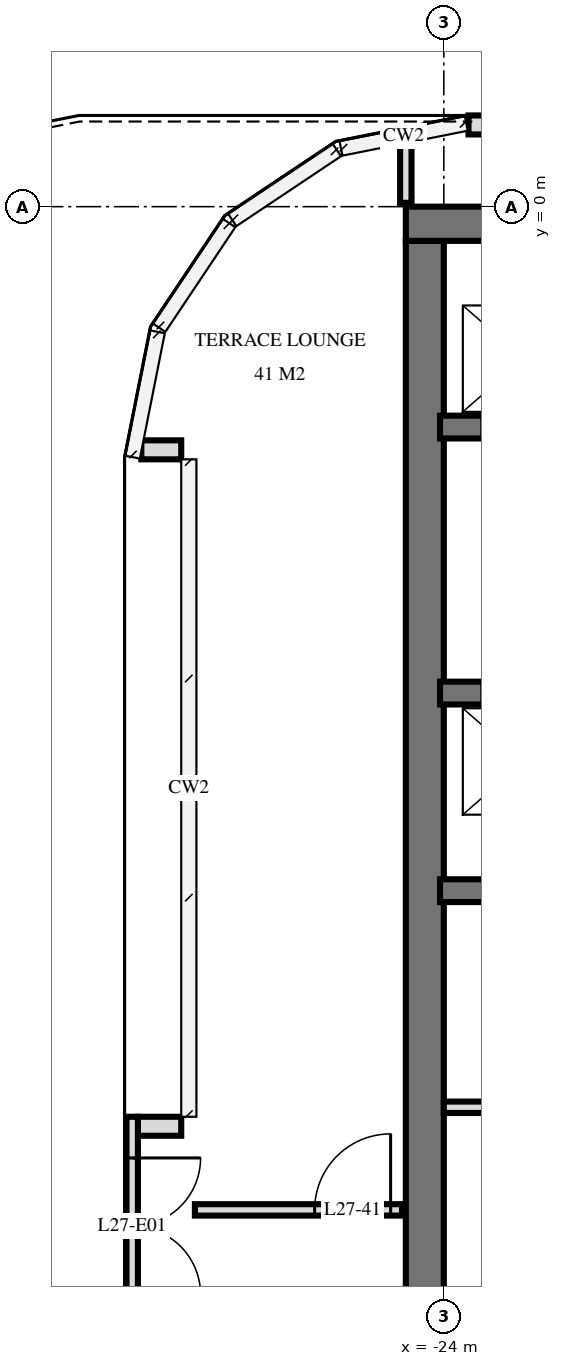
"""IFC4 building model, lengths in metres.
Left out: names, types, materials, properties, quantities, classifications, styles, units other than length and angle.
Written with IfcOpenShell. Run it as: python <this file> out.ifc"""

import sys

from ifc_helpers import new_model, si_unit, direction, frame, frame_2d, origin, place, context, subcontext, project, spatial, rectangle, extrude, element, fill, save


model = new_model("IFC4")
c1 = context("Model", 3, precision=1e-05, world=origin(), true_north=direction((0.0, 1.0)))
c2 = subcontext(c1, "Body", "Model", "MODEL_VIEW")
j1 = project(units=[si_unit("LENGTHUNIT", "METRE"), si_unit("PLANEANGLEUNIT", "RADIAN")], contexts=[c1])
p1 = place(None, origin())
s1 = spatial("IfcSite", under=j1, at=p1, CompositionType="ELEMENT")
p2 = place(p1, origin())
s2 = spatial("IfcBuilding", under=s1, at=p2, CompositionType="ELEMENT")
p3 = place(p2, frame((0.0, 0.0, 106.8)))
s3 = spatial("IfcBuildingStorey", under=s2, at=p3, CompositionType="ELEMENT", Elevation=106.8)
p4 = place(p3, frame((-24.5, -0.225, 0.0), z_axis=(0.0, 0.0, 1.0), x_axis=(1.0, 0.0, 0.0)))
e1 = element("IfcWall", 1, at=p4, inside=s3, PredefinedType="SHEAR", context=c2, shape_type="SweptSolid", body=[
    extrude(rectangle(XDim=14.5, YDim=0.45, at=frame_2d((7.25, 0.0))), origin(), (0.0, 0.0, 1.0), 6.0),
])
p5 = place(p3, frame((-24.25, -14.55, 0.0), z_axis=(0.0, 0.0, 1.0), x_axis=(0.0, 1.0, 0.0)))
e2 = element("IfcWall", 2, at=p5, inside=s3, PredefinedType="SHEAR", context=c2, shape_type="SweptSolid", body=[
    extrude(rectangle(XDim=14.1, YDim=0.5, at=frame_2d((7.05, 0.0))), origin(), (0.0, 0.0, 1.0), 6.0),
])
p6 = place(p3, frame((-24.05, -2.9, 0.0), z_axis=(0.0, 0.0, 1.0), x_axis=(1.0, 0.0, 0.0)))
e3 = element("IfcWall", 3, at=p6, inside=s3, PredefinedType="SHEAR", context=c2, shape_type="SweptSolid", body=[
    extrude(rectangle(XDim=13.7, YDim=0.3, at=frame_2d((6.85, 0.0))), origin(), (0.0, 0.0, 1.0), 6.0),
])
p7 = place(p6, frame((2.95, 0.0, 0.0)))
e4 = element("IfcOpeningElement", 4, at=p7, cuts=e3, PredefinedType="OPENING", context=c2, shape_type="SweptSolid", body=[
    extrude(rectangle(XDim=1.1, YDim=2.1, at=frame_2d((0.55, 1.05))), frame((0.0, 0.16, 0.0), z_axis=(0.0, -1.0, 0.0), x_axis=(1.0, 0.0, 0.0)), (0.0, 0.0, 1.0), 0.32),
])
p8 = place(p6, frame((0.55, 0.0, 0.0)))
e5 = element("IfcOpeningElement", 5, at=p8, cuts=e3, PredefinedType="OPENING", context=c2, shape_type="SweptSolid", body=[
    extrude(rectangle(XDim=1.1, YDim=2.1, at=frame_2d((0.55, 1.05))), frame((0.0, 0.16, 0.0), z_axis=(0.0, -1.0, 0.0), x_axis=(1.0, 0.0, 0.0)), (0.0, 0.0, 1.0), 0.32),
])
p9 = place(p6, frame((6.613, 0.0, 0.0)))
e6 = element("IfcOpeningElement", 6, at=p9, cuts=e3, PredefinedType="OPENING", context=c2, shape_type="SweptSolid", body=[
    extrude(rectangle(XDim=0.9, YDim=2.1, at=frame_2d((0.45, 1.05))), frame((0.0, 0.16, 0.0), z_axis=(0.0, -1.0, 0.0), x_axis=(1.0, 0.0, 0.0)), (0.0, 0.0, 1.0), 0.32),
])
p10 = place(p6, frame((5.188, 0.0, 0.0)))
e7 = element("IfcOpeningElement", 7, at=p10, cuts=e3, PredefinedType="OPENING", context=c2, shape_type="SweptSolid", body=[
    extrude(rectangle(XDim=0.9, YDim=2.1, at=frame_2d((0.45, 1.05))), frame((0.0, 0.16, 0.0), z_axis=(0.0, -1.0, 0.0), x_axis=(1.0, 0.0, 0.0)), (0.0, 0.0, 1.0), 0.32),
])
p11 = place(p6, frame((12.562, 0.0, 0.0)))
e8 = element("IfcOpeningElement", 8, at=p11, cuts=e3, PredefinedType="OPENING", context=c2, shape_type="SweptSolid", body=[
    extrude(rectangle(XDim=1.0, YDim=2.1, at=frame_2d((0.5, 1.05))), frame((0.0, 0.16, 0.0), z_axis=(0.0, -1.0, 0.0), x_axis=(1.0, 0.0, 0.0)), (0.0, 0.0, 1.0), 0.32),
])
p12 = place(p6, frame((11.137, 0.0, 0.0)))
e9 = element("IfcOpeningElement", 9, at=p12, cuts=e3, PredefinedType="OPENING", context=c2, shape_type="SweptSolid", body=[
    extrude(rectangle(XDim=1.0, YDim=2.1, at=frame_2d((0.5, 1.05))), frame((0.0, 0.16, 0.0), z_axis=(0.0, -1.0, 0.0), x_axis=(1.0, 0.0, 0.0)), (0.0, 0.0, 1.0), 0.32),
])
p13 = place(p6, frame((8.85, 0.0, 0.0)))
e10 = element("IfcOpeningElement", 10, at=p13, cuts=e3, PredefinedType="OPENING", context=c2, shape_type="SweptSolid", body=[
    extrude(rectangle(XDim=1.0, YDim=2.1, at=frame_2d((0.5, 1.05))), frame((0.0, 0.16, 0.0), z_axis=(0.0, -1.0, 0.0), x_axis=(1.0, 0.0, 0.0)), (0.0, 0.0, 1.0), 0.32),
])
p14 = place(p3, frame((-24.05, -6.4, 0.0), z_axis=(0.0, 0.0, 1.0), x_axis=(1.0, 0.0, 0.0)))
e11 = element("IfcWall", 11, at=p14, inside=s3, PredefinedType="SHEAR", context=c2, shape_type="SweptSolid", body=[
    extrude(rectangle(XDim=13.7, YDim=0.3, at=frame_2d((6.85, 0.0))), origin(), (0.0, 0.0, 1.0), 6.0),
])
p15 = place(p14, frame((2.95, 0.0, 0.0)))
e12 = element("IfcOpeningElement", 12, at=p15, cuts=e11, PredefinedType="OPENING", context=c2, shape_type="SweptSolid", body=[
    extrude(rectangle(XDim=1.1, YDim=2.1, at=frame_2d((0.55, 1.05))), frame((0.0, 0.16, 0.0), z_axis=(0.0, -1.0, 0.0), x_axis=(1.0, 0.0, 0.0)), (0.0, 0.0, 1.0), 0.32),
])
p16 = place(p14, frame((0.55, 0.0, 0.0)))
e13 = element("IfcOpeningElement", 13, at=p16, cuts=e11, PredefinedType="OPENING", context=c2, shape_type="SweptSolid", body=[
    extrude(rectangle(XDim=1.1, YDim=2.1, at=frame_2d((0.55, 1.05))), frame((0.0, 0.16, 0.0), z_axis=(0.0, -1.0, 0.0), x_axis=(1.0, 0.0, 0.0)), (0.0, 0.0, 1.0), 0.32),
])
p17 = place(p14, frame((5.8, 0.0, 0.0)))
e14 = element("IfcOpeningElement", 14, at=p17, cuts=e11, PredefinedType="OPENING", context=c2, shape_type="SweptSolid", body=[
    extrude(rectangle(XDim=1.1, YDim=2.1, at=frame_2d((0.55, 1.05))), frame((0.0, 0.16, 0.0), z_axis=(0.0, -1.0, 0.0), x_axis=(1.0, 0.0, 0.0)), (0.0, 0.0, 1.0), 0.32),
])
p18 = place(p3, frame((-24.05, -9.0, 0.0), z_axis=(0.0, 0.0, 1.0), x_axis=(1.0, 0.0, 0.0)))
e15 = element("IfcWall", 15, at=p18, inside=s3, PredefinedType="SHEAR", context=c2, shape_type="SweptSolid", body=[
    extrude(rectangle(XDim=13.7, YDim=0.3, at=frame_2d((6.85, 0.0))), origin(), (0.0, 0.0, 1.0), 6.0),
])
p19 = place(p18, frame((8.8, 0.0, 0.0)))
e16 = element("IfcOpeningElement", 16, at=p19, cuts=e15, PredefinedType="OPENING", context=c2, shape_type="SweptSolid", body=[
    extrude(rectangle(XDim=1.1, YDim=2.1, at=frame_2d((0.55, 1.05))), frame((0.0, 0.16, 0.0), z_axis=(0.0, -1.0, 0.0), x_axis=(1.0, 0.0, 0.0)), (0.0, 0.0, 1.0), 0.32),
])
p20 = place(p3, frame((23.675, 1.075, 0.0), z_axis=(0.0, 0.0, 1.0), x_axis=(-1.0, 0.0, 0.0)))
e17 = element("IfcWall", 17, at=p20, inside=s3, PredefinedType="SOLIDWALL", context=c2, shape_type="SweptSolid", body=[
    extrude(rectangle(XDim=47.351, YDim=0.25, at=frame_2d((23.675, 0.0))), origin(), (0.0, 0.0, 1.0), 5.72),
])
p21 = place(p20, frame((0.378, 0.0, 0.858)))
e18 = element("IfcOpeningElement", 18, at=p21, cuts=e17, PredefinedType="OPENING", context=c2, shape_type="SweptSolid", body=[
    extrude(rectangle(XDim=2.4, YDim=3.6, at=frame_2d((1.2, 1.8))), frame((0.0, 0.135, 0.0), z_axis=(0.0, -1.0, 0.0), x_axis=(1.0, 0.0, 0.0)), (0.0, 0.0, 1.0), 0.27),
])
p22 = place(p20, frame((3.535, 0.0, 0.858)))
e19 = element("IfcOpeningElement", 19, at=p22, cuts=e17, PredefinedType="OPENING", context=c2, shape_type="SweptSolid", body=[
    extrude(rectangle(XDim=2.4, YDim=3.6, at=frame_2d((1.2, 1.8))), frame((0.0, 0.135, 0.0), z_axis=(0.0, -1.0, 0.0), x_axis=(1.0, 0.0, 0.0)), (0.0, 0.0, 1.0), 0.27),
])
p23 = place(p20, frame((6.692, 0.0, 0.858)))
e20 = element("IfcOpeningElement", 20, at=p23, cuts=e17, PredefinedType="OPENING", context=c2, shape_type="SweptSolid", body=[
    extrude(rectangle(XDim=2.4, YDim=3.6, at=frame_2d((1.2, 1.8))), frame((0.0, 0.135, 0.0), z_axis=(0.0, -1.0, 0.0), x_axis=(1.0, 0.0, 0.0)), (0.0, 0.0, 1.0), 0.27),
])
p24 = place(p20, frame((9.848, 0.0, 0.858)))
e21 = element("IfcOpeningElement", 21, at=p24, cuts=e17, PredefinedType="OPENING", context=c2, shape_type="SweptSolid", body=[
    extrude(rectangle(XDim=2.4, YDim=3.6, at=frame_2d((1.2, 1.8))), frame((0.0, 0.135, 0.0), z_axis=(0.0, -1.0, 0.0), x_axis=(1.0, 0.0, 0.0)), (0.0, 0.0, 1.0), 0.27),
])
p25 = place(p20, frame((13.005, 0.0, 0.858)))
e22 = element("IfcOpeningElement", 22, at=p25, cuts=e17, PredefinedType="OPENING", context=c2, shape_type="SweptSolid", body=[
    extrude(rectangle(XDim=2.4, YDim=3.6, at=frame_2d((1.2, 1.8))), frame((0.0, 0.135, 0.0), z_axis=(0.0, -1.0, 0.0), x_axis=(1.0, 0.0, 0.0)), (0.0, 0.0, 1.0), 0.27),
])
p26 = place(p20, frame((16.162, 0.0, 0.858)))
e23 = element("IfcOpeningElement", 23, at=p26, cuts=e17, PredefinedType="OPENING", context=c2, shape_type="SweptSolid", body=[
    extrude(rectangle(XDim=2.4, YDim=3.6, at=frame_2d((1.2, 1.8))), frame((0.0, 0.135, 0.0), z_axis=(0.0, -1.0, 0.0), x_axis=(1.0, 0.0, 0.0)), (0.0, 0.0, 1.0), 0.27),
])
p27 = place(p20, frame((19.319, 0.0, 0.858)))
e24 = element("IfcOpeningElement", 24, at=p27, cuts=e17, PredefinedType="OPENING", context=c2, shape_type="SweptSolid", body=[
    extrude(rectangle(XDim=2.4, YDim=3.6, at=frame_2d((1.2, 1.8))), frame((0.0, 0.135, 0.0), z_axis=(0.0, -1.0, 0.0), x_axis=(1.0, 0.0, 0.0)), (0.0, 0.0, 1.0), 0.27),
])
p28 = place(p20, frame((22.475, 0.0, 0.858)))
e25 = element("IfcOpeningElement", 25, at=p28, cuts=e17, PredefinedType="OPENING", context=c2, shape_type="SweptSolid", body=[
    extrude(rectangle(XDim=2.4, YDim=3.6, at=frame_2d((1.2, 1.8))), frame((0.0, 0.135, 0.0), z_axis=(0.0, -1.0, 0.0), x_axis=(1.0, 0.0, 0.0)), (0.0, 0.0, 1.0), 0.27),
])
p29 = place(p20, frame((25.632, 0.0, 0.858)))
e26 = element("IfcOpeningElement", 26, at=p29, cuts=e17, PredefinedType="OPENING", context=c2, shape_type="SweptSolid", body=[
    extrude(rectangle(XDim=2.4, YDim=3.6, at=frame_2d((1.2, 1.8))), frame((0.0, 0.135, 0.0), z_axis=(0.0, -1.0, 0.0), x_axis=(1.0, 0.0, 0.0)), (0.0, 0.0, 1.0), 0.27),
])
p30 = place(p20, frame((28.789, 0.0, 0.858)))
e27 = element("IfcOpeningElement", 27, at=p30, cuts=e17, PredefinedType="OPENING", context=c2, shape_type="SweptSolid", body=[
    extrude(rectangle(XDim=2.4, YDim=3.6, at=frame_2d((1.2, 1.8))), frame((0.0, 0.135, 0.0), z_axis=(0.0, -1.0, 0.0), x_axis=(1.0, 0.0, 0.0)), (0.0, 0.0, 1.0), 0.27),
])
p31 = place(p20, frame((31.946, 0.0, 0.858)))
e28 = element("IfcOpeningElement", 28, at=p31, cuts=e17, PredefinedType="OPENING", context=c2, shape_type="SweptSolid", body=[
    extrude(rectangle(XDim=2.4, YDim=3.6, at=frame_2d((1.2, 1.8))), frame((0.0, 0.135, 0.0), z_axis=(0.0, -1.0, 0.0), x_axis=(1.0, 0.0, 0.0)), (0.0, 0.0, 1.0), 0.27),
])
p32 = place(p20, frame((35.102, 0.0, 0.858)))
e29 = element("IfcOpeningElement", 29, at=p32, cuts=e17, PredefinedType="OPENING", context=c2, shape_type="SweptSolid", body=[
    extrude(rectangle(XDim=2.4, YDim=3.6, at=frame_2d((1.2, 1.8))), frame((0.0, 0.135, 0.0), z_axis=(0.0, -1.0, 0.0), x_axis=(1.0, 0.0, 0.0)), (0.0, 0.0, 1.0), 0.27),
])
p33 = place(p20, frame((38.259, 0.0, 0.858)))
e30 = element("IfcOpeningElement", 30, at=p33, cuts=e17, PredefinedType="OPENING", context=c2, shape_type="SweptSolid", body=[
    extrude(rectangle(XDim=2.4, YDim=3.6, at=frame_2d((1.2, 1.8))), frame((0.0, 0.135, 0.0), z_axis=(0.0, -1.0, 0.0), x_axis=(1.0, 0.0, 0.0)), (0.0, 0.0, 1.0), 0.27),
])
p34 = place(p20, frame((41.416, 0.0, 0.858)))
e31 = element("IfcOpeningElement", 31, at=p34, cuts=e17, PredefinedType="OPENING", context=c2, shape_type="SweptSolid", body=[
    extrude(rectangle(XDim=2.4, YDim=3.6, at=frame_2d((1.2, 1.8))), frame((0.0, 0.135, 0.0), z_axis=(0.0, -1.0, 0.0), x_axis=(1.0, 0.0, 0.0)), (0.0, 0.0, 1.0), 0.27),
])
p35 = place(p20, frame((44.573, 0.0, 0.858)))
e32 = element("IfcOpeningElement", 32, at=p35, cuts=e17, PredefinedType="OPENING", context=c2, shape_type="SweptSolid", body=[
    extrude(rectangle(XDim=2.4, YDim=3.6, at=frame_2d((1.2, 1.8))), frame((0.0, 0.135, 0.0), z_axis=(0.0, -1.0, 0.0), x_axis=(1.0, 0.0, 0.0)), (0.0, 0.0, 1.0), 0.27),
])
p36 = place(p3, frame((-27.455, -12.1, 0.0), z_axis=(0.0, 0.0, 1.0), x_axis=(-1.0, 0.0, 0.0)))
e33 = element("IfcWall", 33, at=p36, inside=s3, PredefinedType="SOLIDWALL", context=c2, shape_type="SweptSolid", body=[
    extrude(rectangle(XDim=0.57, YDim=0.25, at=frame_2d((0.285, 0.0))), origin(), (0.0, 0.0, 1.0), 5.72),
])
p37 = place(p3, frame((-28.1, -11.975, 0.0), z_axis=(0.0, 0.0, 1.0), x_axis=(0.0, -1.0, 0.0)))
e34 = element("IfcWall", 34, at=p37, inside=s3, PredefinedType="USERDEFINED", context=c2, shape_type="SweptSolid", body=[
    extrude(rectangle(XDim=2.884, YDim=0.15, at=frame_2d((1.442, 0.0))), origin(), (0.0, 0.0, 1.0), 5.72),
])
p38 = place(p37, frame((0.542, 0.0, 0.0)))
e35 = element("IfcOpeningElement", 35, at=p38, cuts=e34, PredefinedType="OPENING", context=c2, shape_type="SweptSolid", body=[
    extrude(rectangle(XDim=1.8, YDim=2.4, at=frame_2d((0.9, 1.2))), frame((0.0, 0.085, 0.0), z_axis=(0.0, -1.0, 0.0), x_axis=(1.0, 0.0, 0.0)), (0.0, 0.0, 1.0), 0.17),
])
p39 = place(p3, frame((-27.455, -3.2, 0.0), z_axis=(0.0, 0.0, 1.0), x_axis=(-1.0, 0.0, 0.0)))
e36 = element("IfcWall", 36, at=p39, inside=s3, PredefinedType="SOLIDWALL", context=c2, shape_type="SweptSolid", body=[
    extrude(rectangle(XDim=0.525, YDim=0.25, at=frame_2d((0.262, 0.0))), origin(), (0.0, 0.0, 1.0), 5.72),
])
p40 = place(p3, frame((-24.0, -11.85, 0.0), z_axis=(0.0, 0.0, 1.0), x_axis=(1.0, 0.0, 0.0)))
e37 = element("IfcWall", 37, at=p40, inside=s3, PredefinedType="PARTITIONING", context=c2, shape_type="SweptSolid", body=[
    extrude(rectangle(XDim=2.1, YDim=0.15, at=frame_2d((1.05, 0.0))), origin(), (0.0, 0.0, 1.0), 5.7),
])
p41 = place(p40, frame((0.55, 0.0, 0.0)))
e38 = element("IfcOpeningElement", 38, at=p41, cuts=e37, PredefinedType="OPENING", context=c2, shape_type="SweptSolid", body=[
    extrude(rectangle(XDim=1.0, YDim=2.1, at=frame_2d((0.5, 1.05))), frame((0.0, 0.085, 0.0), z_axis=(0.0, -1.0, 0.0), x_axis=(1.0, 0.0, 0.0)), (0.0, 0.0, 1.0), 0.17),
])
p42 = place(p3, frame((-24.5, 0.05, 0.0), z_axis=(0.0, 0.0, 1.0), x_axis=(0.0, 1.0, 0.0)))
e39 = element("IfcWall", 39, at=p42, inside=s3, PredefinedType="PARTITIONING", context=c2, shape_type="SweptSolid", body=[
    extrude(rectangle(XDim=0.807, YDim=0.15, at=frame_2d((0.404, 0.0))), origin(), (0.0, 0.0, 1.0), 5.7),
])
p43 = place(p3, frame((-27.275, -13.2, 0.0), z_axis=(0.0, 0.0, 1.0), x_axis=(1.0, 0.0, 0.0)))
e40 = element("IfcWall", 40, at=p43, inside=s3, PredefinedType="PARTITIONING", context=c2, shape_type="SweptSolid", body=[
    extrude(rectangle(XDim=2.725, YDim=0.15, at=frame_2d((1.362, 0.0))), origin(), (0.0, 0.0, 1.0), 5.7),
])
p44 = place(p43, frame((1.575, 0.0, 0.0)))
e41 = element("IfcOpeningElement", 41, at=p44, cuts=e40, PredefinedType="OPENING", context=c2, shape_type="SweptSolid", body=[
    extrude(rectangle(XDim=1.0, YDim=2.1, at=frame_2d((0.5, 1.05))), frame((0.0, 0.085, 0.0), z_axis=(0.0, -1.0, 0.0), x_axis=(1.0, 0.0, 0.0)), (0.0, 0.0, 1.0), 0.17),
])
p45 = place(p38, origin())
e42 = element("IfcDoor", 42, at=p45, inside=s3, OperationType="DOUBLE_DOOR_SINGLE_SWING", PredefinedType="DOOR", context=c2, shape_type="SweptSolid", body=[
    extrude(rectangle(XDim=1.8, YDim=2.4, at=frame_2d((0.9, 1.2))), frame((0.0, 0.025, 0.0), z_axis=(0.0, -1.0, 0.0), x_axis=(1.0, 0.0, 0.0)), (0.0, 0.0, 1.0), 0.05),
])
fill(e35, e42)
p46 = place(p44, origin())
e43 = element("IfcDoor", 43, at=p46, inside=s3, OperationType="SINGLE_SWING_LEFT", PredefinedType="DOOR", context=c2, shape_type="SweptSolid", body=[
    extrude(rectangle(XDim=1.0, YDim=2.1, at=frame_2d((0.5, 1.05))), frame((0.0, 0.025, 0.0), z_axis=(0.0, -1.0, 0.0), x_axis=(1.0, 0.0, 0.0)), (0.0, 0.0, 1.0), 0.05),
])
fill(e41, e43)
save(model, sys.argv[1])
